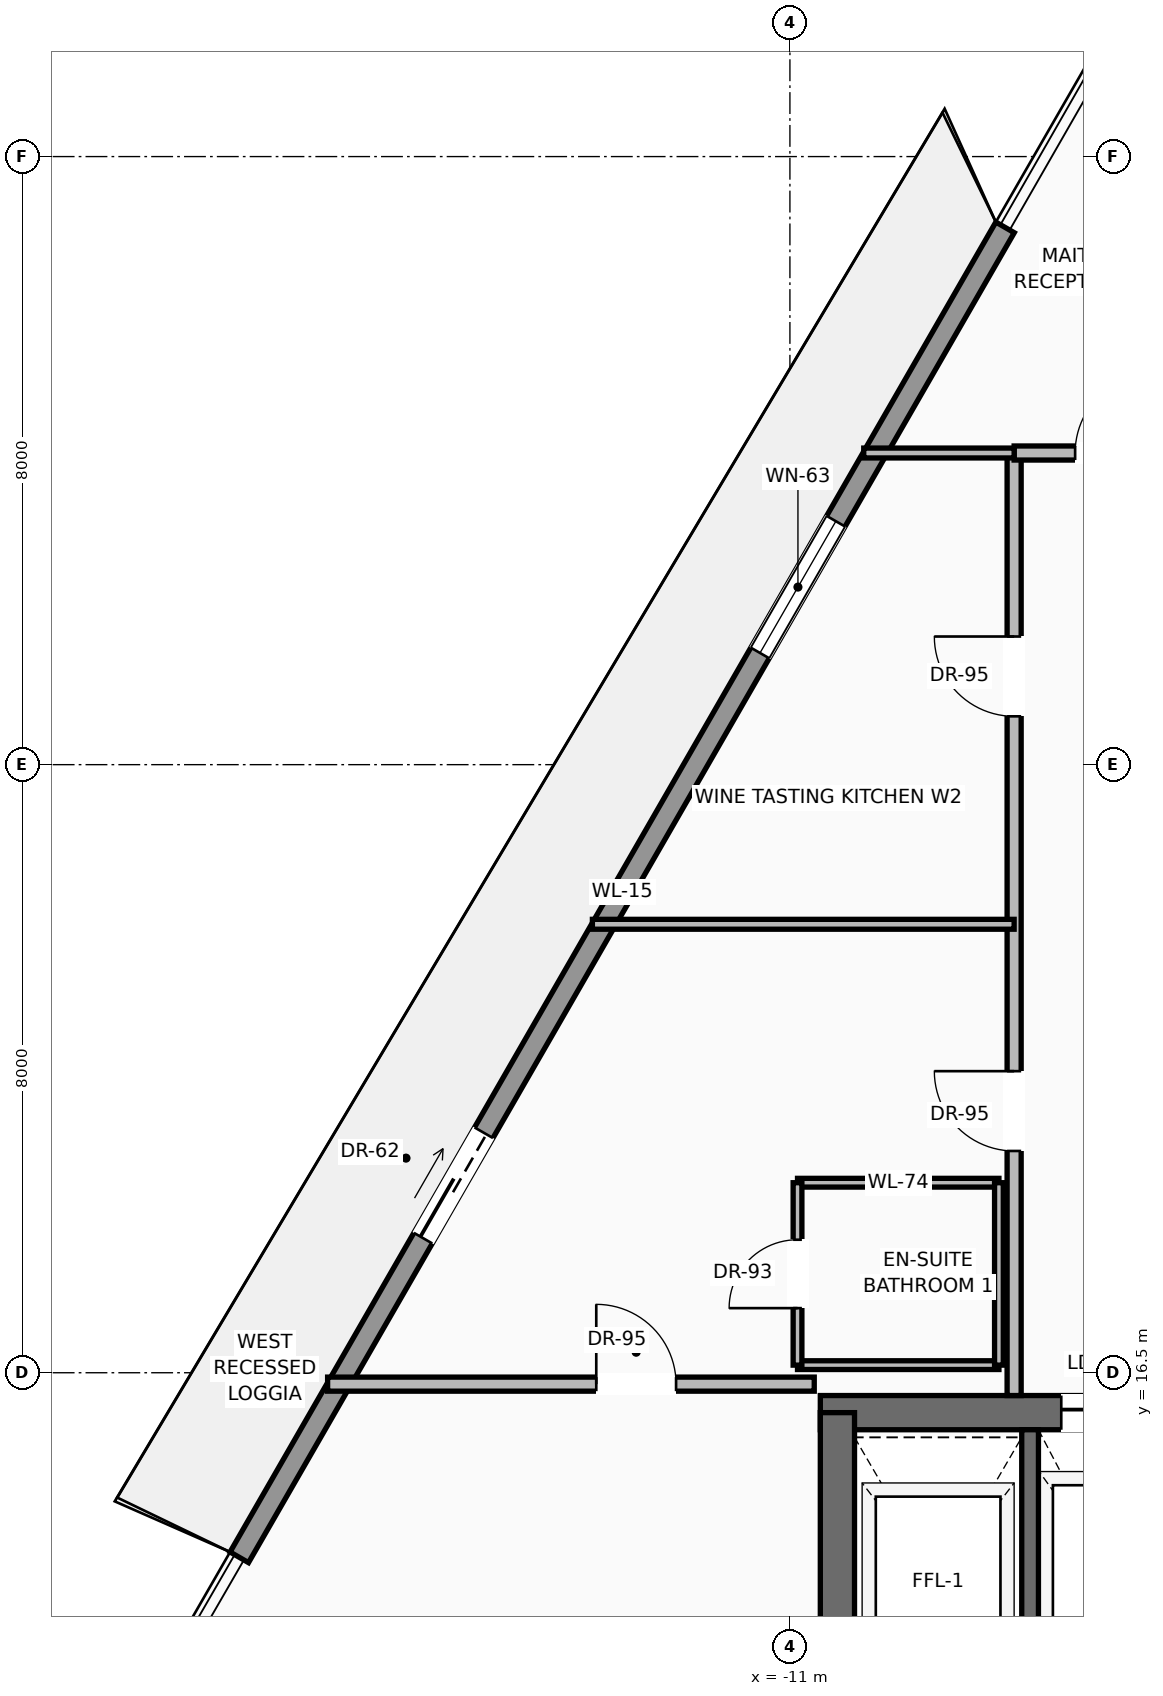
"""IFC4 building model, lengths in metres.
Left out: names, types, materials, properties, quantities, classifications, styles, units other than length and angle.
Written with IfcOpenShell. Run it as: python <this file> out.ifc"""

import sys

from ifc_helpers import new_model, si_unit, direction, frame, frame_2d, origin, place, context, subcontext, project, spatial, rectangle, extrude, source, transform, mapped, element, fill, save


model = new_model("IFC4")
c1 = context("Model", 3, precision=1e-05, world=origin(), true_north=direction((0.0, 1.0)))
c2 = subcontext(c1, "Body", "Model", "MODEL_VIEW")
j1 = project(units=[si_unit("LENGTHUNIT", "METRE"), si_unit("PLANEANGLEUNIT", "RADIAN")], contexts=[c1])
p1 = place(None, origin())
s1 = spatial("IfcSite", under=j1, at=p1, CompositionType="ELEMENT")
p2 = place(p1, origin())
s2 = spatial("IfcBuilding", under=s1, at=p2, CompositionType="ELEMENT")
p3 = place(p2, frame((0.0, 0.0, 283.35)))
s3 = spatial("IfcBuildingStorey", under=s2, at=p3, CompositionType="ELEMENT", Elevation=283.35)
p4 = place(p3, frame((-10.6, 15.975, 0.0), z_axis=(0.0, 0.0, 1.0), x_axis=(1.0, 0.0, 0.0)))
e1 = element("IfcWall", 1, at=p4, inside=s3, PredefinedType="SHEAR", context=c2, shape_type="SweptSolid", body=[
    extrude(rectangle(XDim=21.2, YDim=0.45, at=frame_2d((10.6, 0.0))), origin(), (0.0, 0.0, 1.0), 3.24),
])
p5 = place(p4, frame((3.17, 0.0, 0.0)))
e2 = element("IfcOpeningElement", 2, at=p5, cuts=e1, PredefinedType="OPENING", context=c2, shape_type="SweptSolid", body=[
    extrude(rectangle(XDim=1.3, YDim=2.3, at=frame_2d((0.65, 1.15))), frame((0.0, 0.235, 0.0), z_axis=(0.0, -1.0, 0.0), x_axis=(1.0, 0.0, 0.0)), (0.0, 0.0, 1.0), 0.47),
])
p6 = place(p4, frame((9.6, 0.0, 0.0)))
e3 = element("IfcOpeningElement", 3, at=p6, cuts=e1, PredefinedType="OPENING", context=c2, shape_type="SweptSolid", body=[
    extrude(rectangle(XDim=2.0, YDim=2.4, at=frame_2d((1.0, 1.2))), frame((0.0, 0.235, 0.0), z_axis=(0.0, -1.0, 0.0), x_axis=(1.0, 0.0, 0.0)), (0.0, 0.0, 1.0), 0.47),
])
p7 = place(p3, frame((-10.375, 0.625, 0.0), z_axis=(0.0, 0.0, 1.0), x_axis=(0.0, 1.0, 0.0)))
e4 = element("IfcWall", 4, at=p7, inside=s3, PredefinedType="SHEAR", context=c2, shape_type="SweptSolid", body=[
    extrude(rectangle(XDim=15.35, YDim=0.45, at=frame_2d((7.675, 0.0))), origin(), (0.0, 0.0, 1.0), 3.24),
])
p8 = place(p3, frame((-18.245, 14.072, 0.0), z_axis=(0.0, 0.0, 1.0), x_axis=(0.499006273731, 0.866598372244, 0.0)))
e5 = element("IfcWall", 5, at=p8, inside=s3, PredefinedType="SOLIDWALL", context=c2, shape_type="SweptSolid", body=[
    extrude(rectangle(XDim=20.19, YDim=0.28, at=frame_2d((10.095, 0.0))), origin(), (0.0, 0.0, 1.0), 2.82),
])
p9 = place(p8, frame((4.846, 0.0, 0.0)))
e6 = element("IfcOpeningElement", 6, at=p9, cuts=e5, PredefinedType="OPENING", context=c2, shape_type="SweptSolid", body=[
    extrude(rectangle(XDim=1.6, YDim=2.35, at=frame_2d((0.8, 1.175))), frame((0.0, 0.15, 0.0), z_axis=(0.0, -1.0, 0.0), x_axis=(1.0, 0.0, 0.0)), (0.0, 0.0, 1.0), 0.3),
])
p10 = place(p8, frame((13.729, 0.0, 0.9)))
e7 = element("IfcOpeningElement", 7, at=p10, cuts=e5, PredefinedType="OPENING", context=c2, shape_type="SweptSolid", body=[
    extrude(rectangle(XDim=2.0, YDim=1.75, at=frame_2d((1.0, 0.875))), frame((0.0, 0.15, 0.0), z_axis=(0.0, -1.0, 0.0), x_axis=(1.0, 0.0, 0.0)), (0.0, 0.0, 1.0), 0.3),
])
p11 = place(p3, frame((-7.84, 11.87, 0.0), z_axis=(0.0, 0.0, 1.0), x_axis=(0.0, 1.0, 0.0)))
e8 = element("IfcWall", 8, at=p11, inside=s3, PredefinedType="SOLIDWALL", context=c2, shape_type="SweptSolid", body=[
    extrude(rectangle(XDim=3.88, YDim=0.22, at=frame_2d((1.94, 0.0))), origin(), (0.0, 0.0, 1.0), 3.24),
])
p12 = place(p3, frame((-8.05, 16.2, 0.0), z_axis=(0.0, 0.0, 1.0), x_axis=(0.0, 1.0, 0.0)))
e9 = element("IfcWall", 9, at=p12, inside=s3, PredefinedType="PARTITIONING", context=c2, shape_type="SweptSolid", body=[
    extrude(rectangle(XDim=12.4, YDim=0.185, at=frame_2d((6.2, 0.0))), origin(), (0.0, 0.0, 1.0), 3.232),
])
p13 = place(p12, frame((3.218, 0.0, 0.0)))
e10 = element("IfcOpeningElement", 10, at=p13, cuts=e9, PredefinedType="OPENING", context=c2, shape_type="SweptSolid", body=[
    extrude(rectangle(XDim=1.05, YDim=2.25, at=frame_2d((0.525, 1.125))), frame((0.0, 0.103, 0.0), z_axis=(0.0, -1.0, 0.0), x_axis=(1.0, 0.0, 0.0)), (0.0, 0.0, 1.0), 0.205),
])
p14 = place(p12, frame((8.936, 0.0, 0.0)))
e11 = element("IfcOpeningElement", 11, at=p14, cuts=e9, PredefinedType="OPENING", context=c2, shape_type="SweptSolid", body=[
    extrude(rectangle(XDim=1.05, YDim=2.25, at=frame_2d((0.525, 1.125))), frame((0.0, 0.103, 0.0), z_axis=(0.0, -1.0, 0.0), x_axis=(1.0, 0.0, 0.0)), (0.0, 0.0, 1.0), 0.205),
])
p15 = place(p3, frame((-8.05, 28.6, 0.0), z_axis=(0.0, 0.0, 1.0), x_axis=(1.0, 0.0, 0.0)))
e12 = element("IfcWall", 12, at=p15, inside=s3, PredefinedType="PARTITIONING", context=c2, shape_type="SweptSolid", body=[
    extrude(rectangle(XDim=16.65, YDim=0.185, at=frame_2d((8.325, 0.0))), origin(), (0.0, 0.0, 1.0), 3.232),
])
p16 = place(p15, frame((3.248, 0.0, 0.0)))
e13 = element("IfcOpeningElement", 13, at=p16, cuts=e12, PredefinedType="OPENING", context=c2, shape_type="SweptSolid", body=[
    extrude(rectangle(XDim=1.05, YDim=2.25, at=frame_2d((0.525, 1.125))), frame((0.0, 0.103, 0.0), z_axis=(0.0, -1.0, 0.0), x_axis=(1.0, 0.0, 0.0)), (0.0, 0.0, 1.0), 0.205),
])
p17 = place(p15, frame((7.8, 0.0, 0.0)))
e14 = element("IfcOpeningElement", 14, at=p17, cuts=e12, PredefinedType="OPENING", context=c2, shape_type="SweptSolid", body=[
    extrude(rectangle(XDim=1.05, YDim=2.25, at=frame_2d((0.525, 1.125))), frame((0.0, 0.103, 0.0), z_axis=(0.0, -1.0, 0.0), x_axis=(1.0, 0.0, 0.0)), (0.0, 0.0, 1.0), 0.205),
])
p18 = place(p15, frame((11.802, 0.0, 0.0)))
e15 = element("IfcOpeningElement", 15, at=p18, cuts=e12, PredefinedType="OPENING", context=c2, shape_type="SweptSolid", body=[
    extrude(rectangle(XDim=1.05, YDim=2.25, at=frame_2d((0.525, 1.125))), frame((0.0, 0.103, 0.0), z_axis=(0.0, -1.0, 0.0), x_axis=(1.0, 0.0, 0.0)), (0.0, 0.0, 1.0), 0.205),
])
p19 = place(p15, frame((0.802, 0.0, 0.0)))
e16 = element("IfcOpeningElement", 16, at=p19, cuts=e12, PredefinedType="OPENING", context=c2, shape_type="SweptSolid", body=[
    extrude(rectangle(XDim=1.05, YDim=2.25, at=frame_2d((0.525, 1.125))), frame((0.0, 0.103, 0.0), z_axis=(0.0, -1.0, 0.0), x_axis=(1.0, 0.0, 0.0)), (0.0, 0.0, 1.0), 0.205),
])
p20 = place(p3, frame((-17.083, 16.35, 0.0), z_axis=(0.0, 0.0, 1.0), x_axis=(1.0, 0.0, 0.0)))
e17 = element("IfcWall", 17, at=p20, inside=s3, PredefinedType="PARTITIONING", context=c2, shape_type="SweptSolid", body=[
    extrude(rectangle(XDim=6.403, YDim=0.185, at=frame_2d((3.201, 0.0))), origin(), (0.0, 0.0, 1.0), 3.232),
])
p21 = place(p20, frame((3.535, 0.0, 0.0)))
e18 = element("IfcOpeningElement", 18, at=p21, cuts=e17, PredefinedType="OPENING", context=c2, shape_type="SweptSolid", body=[
    extrude(rectangle(XDim=1.05, YDim=2.25, at=frame_2d((0.525, 1.125))), frame((0.0, 0.103, 0.0), z_axis=(0.0, -1.0, 0.0), x_axis=(1.0, 0.0, 0.0)), (0.0, 0.0, 1.0), 0.205),
])
p22 = place(p3, frame((-10.029, 28.6, 0.0), z_axis=(0.0, 0.0, 1.0), x_axis=(1.0, 0.0, 0.0)))
e19 = element("IfcWall", 19, at=p22, inside=s3, PredefinedType="PARTITIONING", context=c2, shape_type="SweptSolid", body=[
    extrude(rectangle(XDim=1.979, YDim=0.13, at=frame_2d((0.989, 0.0))), origin(), (0.0, 0.0, 1.0), 3.232),
])
for number, where, z_axis, x_axis in (
    (20, (-10.9, 16.6, 0.0), (0.0, 0.0, 1.0), (1.0, 0.0, 0.0)),
    (21, (-10.9, 19.0, 0.0), (0.0, 0.0, 1.0), (1.0, 0.0, 0.0)),
):
    element("IfcWall", number, at=place(p3, frame(where, z_axis=z_axis, x_axis=x_axis)), inside=s3, PredefinedType="PARTITIONING", context=c2, shape_type="SweptSolid", body=[
        extrude(rectangle(XDim=2.65, YDim=0.115, at=frame_2d((1.325, 0.0))), origin(), (0.0, 0.0, 1.0), 3.232),
    ])
p23 = place(p3, frame((-10.9, 16.6, 0.0), z_axis=(0.0, 0.0, 1.0), x_axis=(0.0, 1.0, 0.0)))
e22 = element("IfcWall", 22, at=p23, inside=s3, PredefinedType="PARTITIONING", context=c2, shape_type="SweptSolid", body=[
    extrude(rectangle(XDim=2.4, YDim=0.115, at=frame_2d((1.2, 0.0))), origin(), (0.0, 0.0, 1.0), 3.232),
])
p24 = place(p23, frame((0.75, 0.0, 0.0)))
e23 = element("IfcOpeningElement", 23, at=p24, cuts=e22, PredefinedType="OPENING", context=c2, shape_type="SweptSolid", body=[
    extrude(rectangle(XDim=0.9, YDim=2.15, at=frame_2d((0.45, 1.075))), frame((0.0, 0.067, 0.0), z_axis=(0.0, -1.0, 0.0), x_axis=(1.0, 0.0, 0.0)), (0.0, 0.0, 1.0), 0.135),
])
p25 = place(p3, frame((-8.25, 16.6, 0.0), z_axis=(0.0, 0.0, 1.0), x_axis=(0.0, 1.0, 0.0)))
e24 = element("IfcWall", 24, at=p25, inside=s3, PredefinedType="PARTITIONING", context=c2, shape_type="SweptSolid", body=[
    extrude(rectangle(XDim=2.4, YDim=0.115, at=frame_2d((1.2, 0.0))), origin(), (0.0, 0.0, 1.0), 3.232),
])
p26 = place(p3, frame((-13.599, 22.4, 0.0), z_axis=(0.0, 0.0, 1.0), x_axis=(1.0, 0.0, 0.0)))
e25 = element("IfcWall", 25, at=p26, inside=s3, PredefinedType="PARTITIONING", context=c2, shape_type="SweptSolid", body=[
    extrude(rectangle(XDim=5.549, YDim=0.13, at=frame_2d((2.774, 0.0))), origin(), (0.0, 0.0, 1.0), 3.232),
])
m1 = source(origin(), c2, "Body", "SweptSolid", [
    extrude(rectangle(XDim=1.6, YDim=2.35, at=frame_2d((0.8, 1.175))), frame((0.0, 0.025, 0.0), z_axis=(0.0, -1.0, 0.0), x_axis=(1.0, 0.0, 0.0)), (0.0, 0.0, 1.0), 0.05),
])
p27 = place(p9, origin())
e26 = element("IfcDoor", 26, at=p27, inside=s3, OperationType="SLIDING_TO_LEFT", PredefinedType="DOOR", context=c2, shape_type="MappedRepresentation", body=[
    mapped(m1, transform((0.0, 0.0, 0.0), scale=1.0)),
])
fill(e6, e26)
m2 = source(origin(), c2, "Body", "SweptSolid", [
    extrude(rectangle(XDim=2.0, YDim=1.75, at=frame_2d((1.0, 0.875))), frame((0.0, 0.03, 0.0), z_axis=(0.0, -1.0, 0.0), x_axis=(1.0, 0.0, 0.0)), (0.0, 0.0, 1.0), 0.06),
])
p28 = place(p10, origin())
e27 = element("IfcWindow", 27, at=p28, inside=s3, PartitioningType="SINGLE_PANEL", PredefinedType="WINDOW", context=c2, shape_type="MappedRepresentation", body=[
    mapped(m2, transform((0.0, 0.0, 0.0), scale=1.0)),
])
fill(e7, e27)
m3 = source(origin(), c2, "Body", "SweptSolid", [
    extrude(rectangle(XDim=1.3, YDim=2.3, at=frame_2d((0.65, 1.15))), frame((0.0, 0.025, 0.0), z_axis=(0.0, -1.0, 0.0), x_axis=(1.0, 0.0, 0.0)), (0.0, 0.0, 1.0), 0.05),
])
p29 = place(p5, origin())
e28 = element("IfcDoor", 28, at=p29, inside=s3, OperationType="SLIDING_TO_RIGHT", PredefinedType="DOOR", context=c2, shape_type="MappedRepresentation", body=[
    mapped(m3, transform((0.0, 0.0, 0.0), scale=1.0)),
])
fill(e2, e28)
m4 = source(origin(), c2, "Body", "SweptSolid", [
    extrude(rectangle(XDim=1.05, YDim=2.25, at=frame_2d((0.525, 1.125))), frame((0.0, 0.025, 0.0), z_axis=(0.0, -1.0, 0.0), x_axis=(1.0, 0.0, 0.0)), (0.0, 0.0, 1.0), 0.05),
])
p30 = place(p21, origin())
e29 = element("IfcDoor", 29, at=p30, inside=s3, OperationType="SINGLE_SWING_LEFT", PredefinedType="DOOR", context=c2, shape_type="MappedRepresentation", body=[
    mapped(m4, transform((0.0, 0.0, 0.0), scale=1.0)),
])
fill(e18, e29)
p31 = place(p13, origin())
e30 = element("IfcDoor", 30, at=p31, inside=s3, OperationType="SINGLE_SWING_RIGHT", PredefinedType="DOOR", context=c2, shape_type="MappedRepresentation", body=[
    mapped(m4, transform((0.0, 0.0, 0.0), scale=1.0)),
])
fill(e10, e30)
m5 = source(origin(), c2, "Body", "SweptSolid", [
    extrude(rectangle(XDim=0.9, YDim=2.15, at=frame_2d((0.45, 1.075))), frame((0.0, 0.025, 0.0), z_axis=(0.0, -1.0, 0.0), x_axis=(1.0, 0.0, 0.0)), (0.0, 0.0, 1.0), 0.05),
])
p32 = place(p24, origin())
e31 = element("IfcDoor", 31, at=p32, inside=s3, OperationType="SINGLE_SWING_LEFT", PredefinedType="DOOR", context=c2, shape_type="MappedRepresentation", body=[
    mapped(m5, transform((0.0, 0.0, 0.0), scale=1.0)),
])
fill(e23, e31)
p33 = place(p14, origin())
e32 = element("IfcDoor", 32, at=p33, inside=s3, OperationType="SINGLE_SWING_RIGHT", PredefinedType="DOOR", context=c2, shape_type="MappedRepresentation", body=[
    mapped(m4, transform((0.0, 0.0, 0.0), scale=1.0)),
])
fill(e11, e32)
p34 = place(p19, origin())
e33 = element("IfcDoor", 33, at=p34, inside=s3, OperationType="SINGLE_SWING_RIGHT", PredefinedType="DOOR", context=c2, shape_type="MappedRepresentation", body=[
    mapped(m4, transform((0.0, 0.0, 0.0), scale=1.0)),
])
fill(e16, e33)
save(model, sys.argv[1])
